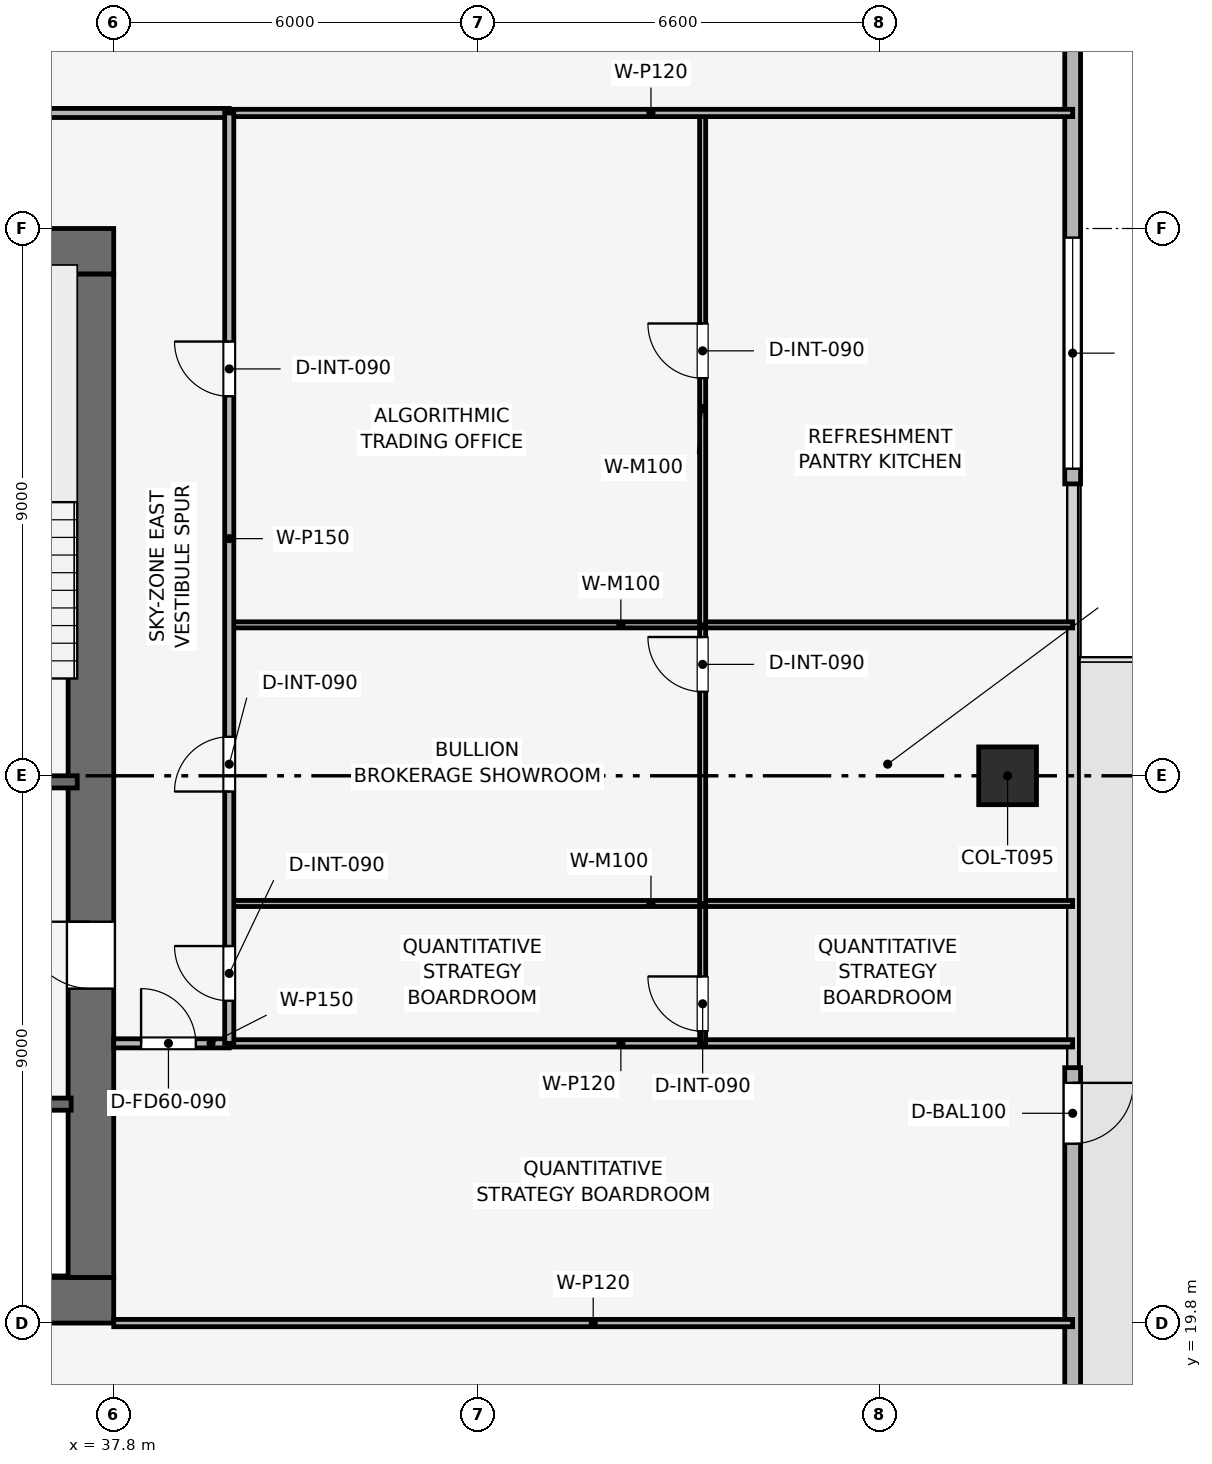
"""IFC4 building model, lengths in metres.
Left out: names, types, materials, properties, quantities, classifications, styles, units other than length and angle.
Written with IfcOpenShell. Run it as: python <this file> out.ifc"""

import sys

from ifc_helpers import new_model, si_unit, direction, frame, frame_2d, origin, origin_2d, place, context, subcontext, project, spatial, rectangle, extrude, element, fill, save


model = new_model("IFC4")
c1 = context("Model", 3, precision=1e-05, world=origin(), true_north=direction((0.0, 1.0)))
c2 = subcontext(c1, "Body", "Model", "MODEL_VIEW")
j1 = project(units=[si_unit("LENGTHUNIT", "METRE"), si_unit("PLANEANGLEUNIT", "RADIAN")], contexts=[c1])
p1 = place(None, origin())
s1 = spatial("IfcSite", under=j1, at=p1, CompositionType="ELEMENT")
p2 = place(p1, origin())
s2 = spatial("IfcBuilding", under=s1, at=p2, CompositionType="ELEMENT")
p3 = place(p2, frame((0.0, 0.0, 265.35)))
s3 = spatial("IfcBuildingStorey", under=s2, at=p3, CompositionType="ELEMENT", Elevation=265.35)
p4 = place(p3, frame((19.8, 20.175, 0.0), z_axis=(0.0, 0.0, 1.0), x_axis=(1.0, 0.0, 0.0)))
e1 = element("IfcWall", 1, at=p4, inside=s3, PredefinedType="SHEAR", context=c2, shape_type="SweptSolid", body=[
    extrude(rectangle(XDim=18.0, YDim=0.75, at=frame_2d((9.0, 0.0))), origin(), (0.0, 0.0, 1.0), 3.75),
])
p5 = place(p3, frame((19.8, 37.425, 0.0), z_axis=(0.0, 0.0, 1.0), x_axis=(1.0, 0.0, 0.0)))
e2 = element("IfcWall", 2, at=p5, inside=s3, PredefinedType="SHEAR", context=c2, shape_type="SweptSolid", body=[
    extrude(rectangle(XDim=18.0, YDim=0.75, at=frame_2d((9.0, 0.0))), origin(), (0.0, 0.0, 1.0), 3.75),
])
p6 = place(p5, frame((7.05, 0.0, 0.0)))
e3 = element("IfcOpeningElement", 3, at=p6, cuts=e2, PredefinedType="OPENING", context=c2, shape_type="SweptSolid", body=[
    extrude(rectangle(XDim=1.1, YDim=2.15, at=frame_2d((0.55, 1.075))), frame((0.0, 0.385, 0.0), z_axis=(0.0, -1.0, 0.0), x_axis=(1.0, 0.0, 0.0)), (0.0, 0.0, 1.0), 0.77),
])
p7 = place(p3, frame((37.425, 20.55, 0.0), z_axis=(0.0, 0.0, 1.0), x_axis=(0.0, 1.0, 0.0)))
e4 = element("IfcWall", 4, at=p7, inside=s3, PredefinedType="SHEAR", context=c2, shape_type="SweptSolid", body=[
    extrude(rectangle(XDim=16.5, YDim=0.75, at=frame_2d((8.25, 0.0))), origin(), (0.0, 0.0, 1.0), 3.75),
])
p8 = place(p7, frame((4.75, 0.0, 0.0)))
e5 = element("IfcOpeningElement", 5, at=p8, cuts=e4, PredefinedType="OPENING", context=c2, shape_type="SweptSolid", body=[
    extrude(rectangle(XDim=1.1, YDim=2.15, at=frame_2d((0.55, 1.075))), frame((0.0, 0.385, 0.0), z_axis=(0.0, -1.0, 0.0), x_axis=(1.0, 0.0, 0.0)), (0.0, 0.0, 1.0), 0.77),
])
p9 = place(p3, frame((52.5, 28.8, 0.003), z_axis=(0.0, 0.0, 1.0), x_axis=(1.0, 0.0, 0.0)))
e6 = element("IfcColumn", 6, at=p9, inside=s3, PredefinedType="COLUMN", context=c2, shape_type="SweptSolid", body=[
    extrude(rectangle(XDim=0.95, YDim=0.95, at=origin_2d()), origin(), (0.0, 0.0, 1.0), 3.494),
])
p10 = place(p3, frame((53.57, 46.8, 0.0), z_axis=(0.0, 0.0, 1.0), x_axis=(0.0, -1.0, 0.0)))
e7 = element("IfcWall", 7, at=p10, inside=s3, PredefinedType="SOLIDWALL", context=c2, shape_type="SweptSolid", body=[
    extrude(rectangle(XDim=13.2, YDim=0.26, at=frame_2d((6.6, 0.0))), origin(), (0.0, 0.0, 1.0), 3.5),
])
p11 = place(p10, frame((9.15, 0.0, 0.9)))
e8 = element("IfcOpeningElement", 8, at=p11, cuts=e7, PredefinedType="OPENING", context=c2, shape_type="SweptSolid", body=[
    extrude(rectangle(XDim=3.8, YDim=1.9, at=frame_2d((1.9, 0.95))), frame((0.0, 0.14, 0.0), z_axis=(0.0, -1.0, 0.0), x_axis=(1.0, 0.0, 0.0)), (0.0, 0.0, 1.0), 0.28),
])
p12 = place(p3, frame((53.57, 24.0, 0.0), z_axis=(0.0, 0.0, 1.0), x_axis=(0.0, -1.0, 0.0)))
e9 = element("IfcWall", 9, at=p12, inside=s3, PredefinedType="SOLIDWALL", context=c2, shape_type="SweptSolid", body=[
    extrude(rectangle(XDim=13.2, YDim=0.26, at=frame_2d((6.6, 0.0))), origin(), (0.0, 0.0, 1.0), 3.5),
])
p13 = place(p12, frame((0.25, 0.0, 0.0)))
e10 = element("IfcOpeningElement", 10, at=p13, cuts=e9, PredefinedType="OPENING", context=c2, shape_type="SweptSolid", body=[
    extrude(rectangle(XDim=1.0, YDim=2.2, at=frame_2d((0.5, 1.1))), frame((0.0, 0.14, 0.0), z_axis=(0.0, -1.0, 0.0), x_axis=(1.0, 0.0, 0.0)), (0.0, 0.0, 1.0), 0.28),
])
p14 = place(p3, frame((34.05, 28.7, 0.0), z_axis=(0.0, 0.0, 1.0), x_axis=(1.0, 0.0, 0.0)))
e11 = element("IfcWall", 11, at=p14, inside=s3, PredefinedType="SHEAR", context=c2, shape_type="SweptSolid", body=[
    extrude(rectangle(XDim=3.15, YDim=0.2, at=frame_2d((1.575, 0.0))), origin(), (0.0, 0.0, 1.0), 3.5),
])
p15 = place(p14, frame((0.8, 0.0, 0.0)))
e12 = element("IfcOpeningElement", 12, at=p15, cuts=e11, PredefinedType="OPENING", context=c2, shape_type="SweptSolid", body=[
    extrude(rectangle(XDim=1.0, YDim=2.1, at=frame_2d((0.5, 1.05))), frame((0.0, 0.11, 0.0), z_axis=(0.0, -1.0, 0.0), x_axis=(1.0, 0.0, 0.0)), (0.0, 0.0, 1.0), 0.22),
])
p16 = place(p3, frame((34.05, 23.4, 0.0), z_axis=(0.0, 0.0, 1.0), x_axis=(1.0, 0.0, 0.0)))
e13 = element("IfcWall", 13, at=p16, inside=s3, PredefinedType="SHEAR", context=c2, shape_type="SweptSolid", body=[
    extrude(rectangle(XDim=3.05, YDim=0.2, at=frame_2d((1.525, 0.0))), origin(), (0.0, 0.0, 1.0), 3.5),
])
p17 = place(p16, frame((1.2, 0.0, 0.0)))
e14 = element("IfcOpeningElement", 14, at=p17, cuts=e13, PredefinedType="OPENING", context=c2, shape_type="SweptSolid", body=[
    extrude(rectangle(XDim=1.1, YDim=2.15, at=frame_2d((0.55, 1.075))), frame((0.0, 0.11, 0.0), z_axis=(0.0, -1.0, 0.0), x_axis=(1.0, 0.0, 0.0)), (0.0, 0.0, 1.0), 0.22),
])
p18 = place(p3, frame((37.8, 19.8, 0.0), z_axis=(0.0, 0.0, 1.0), x_axis=(1.0, 0.0, 0.0)))
e15 = element("IfcWall", 15, at=p18, inside=s3, PredefinedType="PARTITIONING", context=c2, shape_type="SweptSolid", body=[
    extrude(rectangle(XDim=15.77, YDim=0.12, at=frame_2d((7.885, 0.0))), origin(), (0.0, 0.0, 1.0), 3.085),
])
p19 = place(p3, frame((37.8, 24.4, 0.0), z_axis=(0.0, 0.0, 1.0), x_axis=(1.0, 0.0, 0.0)))
e16 = element("IfcWall", 16, at=p19, inside=s3, PredefinedType="PARTITIONING", context=c2, shape_type="SweptSolid", body=[
    extrude(rectangle(XDim=1.9, YDim=0.15, at=frame_2d((0.95, 0.0))), origin(), (0.0, 0.0, 1.0), 3.5),
])
p20 = place(p19, frame((0.45, 0.0, 0.0)))
e17 = element("IfcOpeningElement", 17, at=p20, cuts=e16, PredefinedType="OPENING", context=c2, shape_type="SweptSolid", body=[
    extrude(rectangle(XDim=0.9, YDim=2.1, at=frame_2d((0.45, 1.05))), frame((0.0, 0.085, 0.0), z_axis=(0.0, -1.0, 0.0), x_axis=(1.0, 0.0, 0.0)), (0.0, 0.0, 1.0), 0.17),
])
p21 = place(p3, frame((39.7, 24.4, 0.0), z_axis=(0.0, 0.0, 1.0), x_axis=(1.0, 0.0, 0.0)))
e18 = element("IfcWall", 18, at=p21, inside=s3, PredefinedType="PARTITIONING", context=c2, shape_type="SweptSolid", body=[
    extrude(rectangle(XDim=13.87, YDim=0.12, at=frame_2d((6.935, 0.0))), origin(), (0.0, 0.0, 1.0), 3.085),
])
p22 = place(p3, frame((47.485, 24.4, 0.0), z_axis=(0.0, 0.0, 1.0), x_axis=(0.0, 1.0, 0.0)))
e19 = element("IfcWall", 19, at=p22, inside=s3, PredefinedType="MOVABLE", context=c2, shape_type="SweptSolid", body=[
    extrude(rectangle(XDim=2.3, YDim=0.1, at=frame_2d((1.15, 0.0))), origin(), (0.0, 0.0, 1.0), 3.5),
])
p23 = place(p22, frame((0.2, 0.0, 0.0)))
e20 = element("IfcOpeningElement", 20, at=p23, cuts=e19, PredefinedType="OPENING", context=c2, shape_type="SweptSolid", body=[
    extrude(rectangle(XDim=0.9, YDim=2.1, at=frame_2d((0.45, 1.05))), frame((0.0, 0.06, 0.0), z_axis=(0.0, -1.0, 0.0), x_axis=(1.0, 0.0, 0.0)), (0.0, 0.0, 1.0), 0.12),
])
p24 = place(p3, frame((39.7, 26.7, 0.0), z_axis=(0.0, 0.0, 1.0), x_axis=(1.0, 0.0, 0.0)))
e21 = element("IfcWall", 21, at=p24, inside=s3, PredefinedType="MOVABLE", context=c2, shape_type="SweptSolid", body=[
    extrude(rectangle(XDim=13.87, YDim=0.1, at=frame_2d((6.935, 0.0))), origin(), (0.0, 0.0, 1.0), 3.085),
])
p25 = place(p3, frame((47.485, 26.7, 0.0), z_axis=(0.0, 0.0, 1.0), x_axis=(0.0, 1.0, 0.0)))
e22 = element("IfcWall", 22, at=p25, inside=s3, PredefinedType="MOVABLE", context=c2, shape_type="SweptSolid", body=[
    extrude(rectangle(XDim=4.582, YDim=0.1, at=frame_2d((2.291, 0.0))), origin(), (0.0, 0.0, 1.0), 3.085),
])
p26 = place(p25, frame((3.482, 0.0, 0.0)))
e23 = element("IfcOpeningElement", 23, at=p26, cuts=e22, PredefinedType="OPENING", context=c2, shape_type="SweptSolid", body=[
    extrude(rectangle(XDim=0.9, YDim=2.1, at=frame_2d((0.45, 1.05))), frame((0.0, 0.06, 0.0), z_axis=(0.0, -1.0, 0.0), x_axis=(1.0, 0.0, 0.0)), (0.0, 0.0, 1.0), 0.12),
])
p27 = place(p3, frame((39.7, 31.282, 0.0), z_axis=(0.0, 0.0, 1.0), x_axis=(1.0, 0.0, 0.0)))
e24 = element("IfcWall", 24, at=p27, inside=s3, PredefinedType="MOVABLE", context=c2, shape_type="SweptSolid", body=[
    extrude(rectangle(XDim=13.87, YDim=0.1, at=frame_2d((6.935, 0.0))), origin(), (0.0, 0.0, 1.0), 3.085),
])
p28 = place(p3, frame((47.485, 31.282, 0.0), z_axis=(0.0, 0.0, 1.0), x_axis=(0.0, 1.0, 0.0)))
e25 = element("IfcWall", 25, at=p28, inside=s3, PredefinedType="MOVABLE", context=c2, shape_type="SweptSolid", body=[
    extrude(rectangle(XDim=8.418, YDim=0.1, at=frame_2d((4.209, 0.0))), origin(), (0.0, 0.0, 1.0), 3.085),
])
p29 = place(p28, frame((4.056, 0.0, 0.0)))
e26 = element("IfcOpeningElement", 26, at=p29, cuts=e25, PredefinedType="OPENING", context=c2, shape_type="SweptSolid", body=[
    extrude(rectangle(XDim=0.9, YDim=2.1, at=frame_2d((0.45, 1.05))), frame((0.0, 0.06, 0.0), z_axis=(0.0, -1.0, 0.0), x_axis=(1.0, 0.0, 0.0)), (0.0, 0.0, 1.0), 0.12),
])
p30 = place(p3, frame((39.7, 39.7, 0.0), z_axis=(0.0, 0.0, 1.0), x_axis=(1.0, 0.0, 0.0)))
e27 = element("IfcWall", 27, at=p30, inside=s3, PredefinedType="PARTITIONING", context=c2, shape_type="SweptSolid", body=[
    extrude(rectangle(XDim=13.87, YDim=0.12, at=frame_2d((6.935, 0.0))), origin(), (0.0, 0.0, 1.0), 3.085),
])
p31 = place(p3, frame((17.9, 39.7, 0.0), z_axis=(0.0, 0.0, 1.0), x_axis=(1.0, 0.0, 0.0)))
e28 = element("IfcWall", 28, at=p31, inside=s3, PredefinedType="PARTITIONING", context=c2, shape_type="SweptSolid", body=[
    extrude(rectangle(XDim=21.8, YDim=0.15, at=frame_2d((10.9, 0.0))), origin(), (0.0, 0.0, 1.0), 3.085),
])
p32 = place(p31, frame((0.9, 0.0, 0.0)))
e29 = element("IfcOpeningElement", 29, at=p32, cuts=e28, PredefinedType="OPENING", context=c2, shape_type="SweptSolid", body=[
    extrude(rectangle(XDim=0.9, YDim=2.1, at=frame_2d((0.45, 1.05))), frame((0.0, 0.085, 0.0), z_axis=(0.0, -1.0, 0.0), x_axis=(1.0, 0.0, 0.0)), (0.0, 0.0, 1.0), 0.17),
])
p33 = place(p31, frame((3.65, 0.0, 0.0)))
e30 = element("IfcOpeningElement", 30, at=p33, cuts=e28, PredefinedType="OPENING", context=c2, shape_type="SweptSolid", body=[
    extrude(rectangle(XDim=0.9, YDim=2.1, at=frame_2d((0.45, 1.05))), frame((0.0, 0.085, 0.0), z_axis=(0.0, -1.0, 0.0), x_axis=(1.0, 0.0, 0.0)), (0.0, 0.0, 1.0), 0.17),
])
p34 = place(p31, frame((6.55, 0.0, 0.0)))
e31 = element("IfcOpeningElement", 31, at=p34, cuts=e28, PredefinedType="OPENING", context=c2, shape_type="SweptSolid", body=[
    extrude(rectangle(XDim=0.9, YDim=2.1, at=frame_2d((0.45, 1.05))), frame((0.0, 0.085, 0.0), z_axis=(0.0, -1.0, 0.0), x_axis=(1.0, 0.0, 0.0)), (0.0, 0.0, 1.0), 0.17),
])
p35 = place(p31, frame((9.3, 0.0, 0.0)))
e32 = element("IfcOpeningElement", 32, at=p35, cuts=e28, PredefinedType="OPENING", context=c2, shape_type="SweptSolid", body=[
    extrude(rectangle(XDim=0.95, YDim=2.1, at=frame_2d((0.475, 1.05))), frame((0.0, 0.085, 0.0), z_axis=(0.0, -1.0, 0.0), x_axis=(1.0, 0.0, 0.0)), (0.0, 0.0, 1.0), 0.17),
])
p36 = place(p31, frame((16.0, 0.0, 0.0)))
e33 = element("IfcOpeningElement", 33, at=p36, cuts=e28, PredefinedType="OPENING", context=c2, shape_type="SweptSolid", body=[
    extrude(rectangle(XDim=0.9, YDim=2.1, at=frame_2d((0.45, 1.05))), frame((0.0, 0.085, 0.0), z_axis=(0.0, -1.0, 0.0), x_axis=(1.0, 0.0, 0.0)), (0.0, 0.0, 1.0), 0.17),
])
p37 = place(p3, frame((39.7, 24.4, 0.0), z_axis=(0.0, 0.0, 1.0), x_axis=(0.0, 1.0, 0.0)))
e34 = element("IfcWall", 34, at=p37, inside=s3, PredefinedType="PARTITIONING", context=c2, shape_type="SweptSolid", body=[
    extrude(rectangle(XDim=15.3, YDim=0.15, at=frame_2d((7.65, 0.0))), origin(), (0.0, 0.0, 1.0), 3.085),
])
p38 = place(p37, frame((0.7, 0.0, 0.0)))
e35 = element("IfcOpeningElement", 35, at=p38, cuts=e34, PredefinedType="OPENING", context=c2, shape_type="SweptSolid", body=[
    extrude(rectangle(XDim=0.9, YDim=2.1, at=frame_2d((0.45, 1.05))), frame((0.0, 0.085, 0.0), z_axis=(0.0, -1.0, 0.0), x_axis=(1.0, 0.0, 0.0)), (0.0, 0.0, 1.0), 0.17),
])
p39 = place(p37, frame((4.141, 0.0, 0.0)))
e36 = element("IfcOpeningElement", 36, at=p39, cuts=e34, PredefinedType="OPENING", context=c2, shape_type="SweptSolid", body=[
    extrude(rectangle(XDim=0.9, YDim=2.1, at=frame_2d((0.45, 1.05))), frame((0.0, 0.085, 0.0), z_axis=(0.0, -1.0, 0.0), x_axis=(1.0, 0.0, 0.0)), (0.0, 0.0, 1.0), 0.17),
])
p40 = place(p37, frame((10.641, 0.0, 0.0)))
e37 = element("IfcOpeningElement", 37, at=p40, cuts=e34, PredefinedType="OPENING", context=c2, shape_type="SweptSolid", body=[
    extrude(rectangle(XDim=0.9, YDim=2.1, at=frame_2d((0.45, 1.05))), frame((0.0, 0.085, 0.0), z_axis=(0.0, -1.0, 0.0), x_axis=(1.0, 0.0, 0.0)), (0.0, 0.0, 1.0), 0.17),
])
p41 = place(p13, origin())
e38 = element("IfcDoor", 38, at=p41, inside=s3, OperationType="SINGLE_SWING_LEFT", PredefinedType="DOOR", context=c2, shape_type="SweptSolid", body=[
    extrude(rectangle(XDim=1.0, YDim=2.2, at=frame_2d((0.5, 1.1))), frame((0.0, 0.025, 0.0), z_axis=(0.0, -1.0, 0.0), x_axis=(1.0, 0.0, 0.0)), (0.0, 0.0, 1.0), 0.05),
])
fill(e10, e38)
p42 = place(p11, origin())
e39 = element("IfcWindow", 39, at=p42, inside=s3, PartitioningType="SINGLE_PANEL", PredefinedType="WINDOW", context=c2, shape_type="SweptSolid", body=[
    extrude(rectangle(XDim=3.8, YDim=1.9, at=frame_2d((1.9, 0.95))), frame((0.0, 0.03, 0.0), z_axis=(0.0, -1.0, 0.0), x_axis=(1.0, 0.0, 0.0)), (0.0, 0.0, 1.0), 0.06),
])
fill(e8, e39)
p43 = place(p20, origin())
e40 = element("IfcDoor", 40, at=p43, inside=s3, OperationType="SINGLE_SWING_LEFT", PredefinedType="DOOR", context=c2, shape_type="SweptSolid", body=[
    extrude(rectangle(XDim=0.9, YDim=2.1, at=frame_2d((0.45, 1.05))), frame((0.0, 0.025, 0.0), z_axis=(0.0, -1.0, 0.0), x_axis=(1.0, 0.0, 0.0)), (0.0, 0.0, 1.0), 0.05),
])
fill(e17, e40)
p44 = place(p23, origin())
e41 = element("IfcDoor", 41, at=p44, inside=s3, OperationType="SINGLE_SWING_RIGHT", PredefinedType="DOOR", context=c2, shape_type="SweptSolid", body=[
    extrude(rectangle(XDim=0.9, YDim=2.1, at=frame_2d((0.45, 1.05))), frame((0.0, 0.025, 0.0), z_axis=(0.0, -1.0, 0.0), x_axis=(1.0, 0.0, 0.0)), (0.0, 0.0, 1.0), 0.05),
])
fill(e20, e41)
p45 = place(p26, origin())
e42 = element("IfcDoor", 42, at=p45, inside=s3, OperationType="SINGLE_SWING_RIGHT", PredefinedType="DOOR", context=c2, shape_type="SweptSolid", body=[
    extrude(rectangle(XDim=0.9, YDim=2.1, at=frame_2d((0.45, 1.05))), frame((0.0, 0.025, 0.0), z_axis=(0.0, -1.0, 0.0), x_axis=(1.0, 0.0, 0.0)), (0.0, 0.0, 1.0), 0.05),
])
fill(e23, e42)
p46 = place(p29, origin())
e43 = element("IfcDoor", 43, at=p46, inside=s3, OperationType="SINGLE_SWING_RIGHT", PredefinedType="DOOR", context=c2, shape_type="SweptSolid", body=[
    extrude(rectangle(XDim=0.9, YDim=2.1, at=frame_2d((0.45, 1.05))), frame((0.0, 0.025, 0.0), z_axis=(0.0, -1.0, 0.0), x_axis=(1.0, 0.0, 0.0)), (0.0, 0.0, 1.0), 0.05),
])
fill(e26, e43)
p47 = place(p38, origin())
e44 = element("IfcDoor", 44, at=p47, inside=s3, OperationType="SINGLE_SWING_RIGHT", PredefinedType="DOOR", context=c2, shape_type="SweptSolid", body=[
    extrude(rectangle(XDim=0.9, YDim=2.1, at=frame_2d((0.45, 1.05))), frame((0.0, 0.025, 0.0), z_axis=(0.0, -1.0, 0.0), x_axis=(1.0, 0.0, 0.0)), (0.0, 0.0, 1.0), 0.05),
])
fill(e35, e44)
p48 = place(p39, origin())
e45 = element("IfcDoor", 45, at=p48, inside=s3, OperationType="SINGLE_SWING_LEFT", PredefinedType="DOOR", context=c2, shape_type="SweptSolid", body=[
    extrude(rectangle(XDim=0.9, YDim=2.1, at=frame_2d((0.45, 1.05))), frame((0.0, 0.025, 0.0), z_axis=(0.0, -1.0, 0.0), x_axis=(1.0, 0.0, 0.0)), (0.0, 0.0, 1.0), 0.05),
])
fill(e36, e45)
p49 = place(p40, origin())
e46 = element("IfcDoor", 46, at=p49, inside=s3, OperationType="SINGLE_SWING_RIGHT", PredefinedType="DOOR", context=c2, shape_type="SweptSolid", body=[
    extrude(rectangle(XDim=0.9, YDim=2.1, at=frame_2d((0.45, 1.05))), frame((0.0, 0.025, 0.0), z_axis=(0.0, -1.0, 0.0), x_axis=(1.0, 0.0, 0.0)), (0.0, 0.0, 1.0), 0.05),
])
fill(e37, e46)
p50 = place(p8, origin())
e47 = element("IfcDoor", 47, at=p50, inside=s3, OperationType="SINGLE_SWING_RIGHT", PredefinedType="DOOR", context=c2, shape_type="SweptSolid", body=[
    extrude(rectangle(XDim=1.1, YDim=2.15, at=frame_2d((0.55, 1.075))), frame((0.0, 0.025, 0.0), z_axis=(0.0, -1.0, 0.0), x_axis=(1.0, 0.0, 0.0)), (0.0, 0.0, 1.0), 0.05),
])
fill(e5, e47)
save(model, sys.argv[1])
